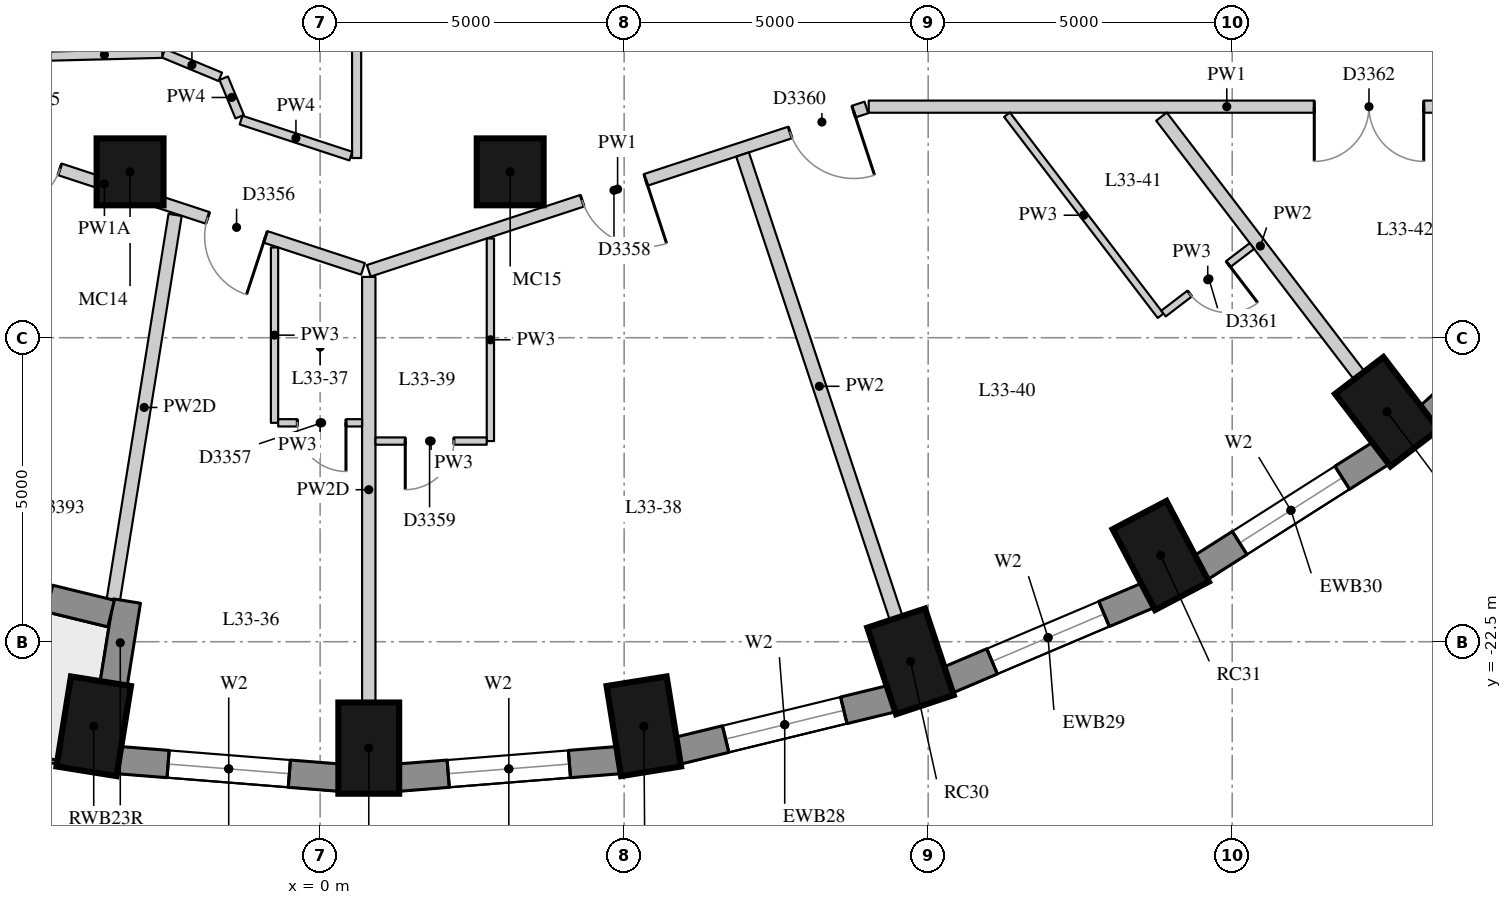
"""IFC4 building model, lengths in metres.
Left out: names, types, materials, properties, quantities, classifications, styles, units other than length and angle.
Written with IfcOpenShell. Run it as: python <this file> out.ifc"""

import sys

from ifc_helpers import new_model, si_unit, direction, frame, frame_2d, origin, origin_2d, place, context, subcontext, project, spatial, rectangle, extrude, element, fill, save


model = new_model("IFC4")
c1 = context("Model", 3, precision=1e-05, world=origin(), true_north=direction((0.0, 1.0)))
c2 = subcontext(c1, "Body", "Model", "MODEL_VIEW")
j1 = project(units=[si_unit("LENGTHUNIT", "METRE"), si_unit("PLANEANGLEUNIT", "RADIAN")], contexts=[c1])
p1 = place(None, origin())
s1 = spatial("IfcSite", under=j1, at=p1, CompositionType="ELEMENT")
p2 = place(p1, origin())
s2 = spatial("IfcBuilding", under=s1, at=p2, CompositionType="ELEMENT")
p3 = place(p2, frame((0.0, 0.0, 118.6)))
s3 = spatial("IfcBuildingStorey", under=s2, at=p3, CompositionType="ELEMENT", Elevation=118.6)
for number, where, z_axis, x_axis in (
    (1, (-3.724, -23.891, 0.0), (0.0, 0.0, 1.0), (-0.159, -0.987, 0.0)),
    (2, (0.8, -24.25, 0.0), (0.0, 0.0, 1.0), (0.0, -1.0, 0.0)),
    (3, (5.323, -23.891, 0.0), (0.0, 0.0, 1.0), (0.159, -0.987, 0.0)),
    (4, (9.71, -22.824, 0.0), (0.0, 0.0, 1.0), (0.315, -0.949, 0.0)),
    (5, (13.825, -21.082, 0.0), (0.0, 0.0, 1.0), (0.465, -0.885, 0.0)),
    (6, (17.545, -18.717, 0.0), (0.0, 0.0, 1.0), (0.607, -0.795, 0.0)),
):
    element("IfcColumn", number, at=place(p3, frame(where, z_axis=z_axis, x_axis=x_axis)), inside=s3, PredefinedType="COLUMN", context=c2, shape_type="SweptSolid", body=[
        extrude(rectangle(XDim=1.5, YDim=1.0, at=origin_2d()), origin(), (0.0, 0.0, 1.0), 3.3),
    ])
for number, where, z_axis, x_axis in (
    (7, (-3.126, -14.772, 0.0), (0.0, 0.0, 1.0), (1.0, 0.0, 0.0)),
    (8, (3.126, -14.772, 0.0), (0.0, 0.0, 1.0), (1.0, 0.0, 0.0)),
):
    element("IfcColumn", number, at=place(p3, frame(where, z_axis=z_axis, x_axis=x_axis)), inside=s3, PredefinedType="COLUMN", context=c2, shape_type="SweptSolid", body=[
        extrude(rectangle(XDim=1.1, YDim=1.1, at=origin_2d()), origin(), (0.0, 0.0, 1.0), 3.3),
    ])
p4 = place(p3, frame((-3.327, -24.447, 0.0), z_axis=(0.0, 0.0, 1.0), x_axis=(0.996862216754, -0.079156306178, 0.0)))
e9 = element("IfcWall", 9, at=p4, inside=s3, PredefinedType="SOLIDWALL", context=c2, shape_type="SweptSolid", body=[
    extrude(rectangle(XDim=3.658, YDim=0.45, at=frame_2d((1.829, 0.0))), origin(), (0.0, 0.0, 1.0), 3.02),
])
p5 = place(p4, frame((0.829, 0.0, 0.4)))
e10 = element("IfcOpeningElement", 10, at=p5, cuts=e9, PredefinedType="OPENING", context=c2, shape_type="SweptSolid", body=[
    extrude(rectangle(XDim=2.0, YDim=1.75, at=frame_2d((1.0, 0.875))), frame((0.0, 0.235, 0.0), z_axis=(0.0, -1.0, 0.0), x_axis=(1.0, 0.0, 0.0)), (0.0, 0.0, 1.0), 0.47),
])
p6 = place(p3, frame((1.28, -24.736, 0.0), z_axis=(0.0, 0.0, 1.0), x_axis=(0.996862216754, 0.079156306178, 0.0)))
e11 = element("IfcWall", 11, at=p6, inside=s3, PredefinedType="SOLIDWALL", context=c2, shape_type="SweptSolid", body=[
    extrude(rectangle(XDim=3.658, YDim=0.45, at=frame_2d((1.829, 0.0))), origin(), (0.0, 0.0, 1.0), 3.02),
])
p7 = place(p6, frame((0.829, 0.0, 0.4)))
e12 = element("IfcOpeningElement", 12, at=p7, cuts=e11, PredefinedType="OPENING", context=c2, shape_type="SweptSolid", body=[
    extrude(rectangle(XDim=2.0, YDim=1.75, at=frame_2d((1.0, 0.875))), frame((0.0, 0.235, 0.0), z_axis=(0.0, -1.0, 0.0), x_axis=(1.0, 0.0, 0.0)), (0.0, 0.0, 1.0), 0.47),
])
p8 = place(p3, frame((5.875, -24.294, 0.0), z_axis=(0.0, 0.0, 1.0), x_axis=(0.971667603162, 0.236351579148, 0.0)))
e13 = element("IfcWall", 13, at=p8, inside=s3, PredefinedType="SOLIDWALL", context=c2, shape_type="SweptSolid", body=[
    extrude(rectangle(XDim=3.635, YDim=0.45, at=frame_2d((1.817, 0.0))), origin(), (0.0, 0.0, 1.0), 3.02),
])
p9 = place(p8, frame((0.817, 0.0, 0.4)))
e14 = element("IfcOpeningElement", 14, at=p9, cuts=e13, PredefinedType="OPENING", context=c2, shape_type="SweptSolid", body=[
    extrude(rectangle(XDim=2.0, YDim=1.75, at=frame_2d((1.0, 0.875))), frame((0.0, 0.235, 0.0), z_axis=(0.0, -1.0, 0.0), x_axis=(1.0, 0.0, 0.0)), (0.0, 0.0, 1.0), 0.47),
])
p10 = place(p3, frame((10.318, -23.134, 0.0), z_axis=(0.0, 0.0, 1.0), x_axis=(0.920869643542, 0.389870619055, 0.0)))
e15 = element("IfcWall", 15, at=p10, inside=s3, PredefinedType="SOLIDWALL", context=c2, shape_type="SweptSolid", body=[
    extrude(rectangle(XDim=3.591, YDim=0.45, at=frame_2d((1.796, 0.0))), origin(), (0.0, 0.0, 1.0), 3.02),
])
p11 = place(p10, frame((0.796, 0.0, 0.4)))
e16 = element("IfcOpeningElement", 16, at=p11, cuts=e15, PredefinedType="OPENING", context=c2, shape_type="SweptSolid", body=[
    extrude(rectangle(XDim=2.0, YDim=1.75, at=frame_2d((1.0, 0.875))), frame((0.0, 0.235, 0.0), z_axis=(0.0, -1.0, 0.0), x_axis=(1.0, 0.0, 0.0)), (0.0, 0.0, 1.0), 0.47),
])
p12 = place(p3, frame((14.475, -21.287, 0.0), z_axis=(0.0, 0.0, 1.0), x_axis=(0.843911841423, 0.536481876587, 0.0)))
e17 = element("IfcWall", 17, at=p12, inside=s3, PredefinedType="SOLIDWALL", context=c2, shape_type="SweptSolid", body=[
    extrude(rectangle(XDim=3.532, YDim=0.45, at=frame_2d((1.766, 0.0))), origin(), (0.0, 0.0, 1.0), 3.02),
])
p13 = place(p12, frame((0.766, 0.0, 0.4)))
e18 = element("IfcOpeningElement", 18, at=p13, cuts=e17, PredefinedType="OPENING", context=c2, shape_type="SweptSolid", body=[
    extrude(rectangle(XDim=2.0, YDim=1.75, at=frame_2d((1.0, 0.875))), frame((0.0, 0.235, 0.0), z_axis=(0.0, -1.0, 0.0), x_axis=(1.0, 0.0, 0.0)), (0.0, 0.0, 1.0), 0.47),
])
p14 = place(p3, frame((18.219, -18.81, 0.0), z_axis=(0.0, 0.0, 1.0), x_axis=(0.740364106106, 0.672206062446, 0.0)))
e19 = element("IfcWall", 19, at=p14, inside=s3, PredefinedType="SOLIDWALL", context=c2, shape_type="SweptSolid", body=[
    extrude(rectangle(XDim=3.464, YDim=0.45, at=frame_2d((1.732, 0.0))), origin(), (0.0, 0.0, 1.0), 3.02),
])
p15 = place(p3, frame((-3.397, -23.204, 0.0), z_axis=(0.0, 0.0, 1.0), x_axis=(0.158415168535, 0.987372591466, 0.0)))
e20 = element("IfcWall", 20, at=p15, inside=s3, PredefinedType="SOLIDWALL", context=c2, shape_type="SweptSolid", body=[
    extrude(rectangle(XDim=1.39, YDim=0.45, at=frame_2d((0.695, 0.0))), origin(), (0.0, 0.0, 1.0), 2.47),
])
p16 = place(p3, frame((-7.558, -21.032, 0.0), z_axis=(0.0, 0.0, 1.0), x_axis=(0.971511611373, -0.23699195971, 0.0)))
e21 = element("IfcWall", 21, at=p16, inside=s3, PredefinedType="SOLIDWALL", context=c2, shape_type="SweptSolid", body=[
    extrude(rectangle(XDim=4.241, YDim=0.45, at=frame_2d((2.121, 0.0))), origin(), (0.0, 0.0, 1.0), 3.02),
])
p17 = place(p16, frame((1.046, 0.0, 0.4)))
e22 = element("IfcOpeningElement", 22, at=p17, cuts=e21, PredefinedType="OPENING", context=c2, shape_type="SweptSolid", body=[
    extrude(rectangle(XDim=1.0, YDim=1.75, at=frame_2d((0.5, 0.875))), frame((0.0, 0.235, 0.0), z_axis=(0.0, -1.0, 0.0), x_axis=(1.0, 0.0, 0.0)), (0.0, 0.0, 1.0), 0.47),
])
p18 = place(p16, frame((2.196, 0.0, 0.0)))
e23 = element("IfcOpeningElement", 23, at=p18, cuts=e21, PredefinedType="OPENING", context=c2, shape_type="SweptSolid", body=[
    extrude(rectangle(XDim=1.0, YDim=2.15, at=frame_2d((0.5, 1.075))), frame((0.0, 0.235, 0.0), z_axis=(0.0, -1.0, 0.0), x_axis=(1.0, 0.0, 0.0)), (0.0, 0.0, 1.0), 0.47),
])
p19 = place(p3, frame((20.8, -13.7, 0.0), z_axis=(0.0, 0.0, 1.0), x_axis=(-1.0, 0.0, 0.0)))
e24 = element("IfcWall", 24, at=p19, inside=s3, PredefinedType="PARTITIONING", context=c2, shape_type="SweptSolid", body=[
    extrude(rectangle(XDim=11.778, YDim=0.2, at=frame_2d((5.889, 0.0))), origin(), (0.0, 0.0, 1.0), 3.02),
])
p20 = place(p19, frame((2.65, 0.0, 0.0)))
e25 = element("IfcOpeningElement", 25, at=p20, cuts=e24, PredefinedType="OPENING", context=c2, shape_type="SweptSolid", body=[
    extrude(rectangle(XDim=1.8, YDim=2.1, at=frame_2d((0.9, 1.05))), frame((0.0, 0.11, 0.0), z_axis=(0.0, -1.0, 0.0), x_axis=(1.0, 0.0, 0.0)), (0.0, 0.0, 1.0), 0.22),
])
p21 = place(p3, frame((8.984, -13.713, 0.0), z_axis=(0.0, 0.0, 1.0), x_axis=(-0.950093687873, -0.311964716378, 0.0)))
e26 = element("IfcWall", 26, at=p21, inside=s3, PredefinedType="PARTITIONING", context=c2, shape_type="SweptSolid", body=[
    extrude(rectangle(XDim=8.614, YDim=0.2, at=frame_2d((4.307, 0.0))), origin(), (0.0, 0.0, 1.0), 3.02),
])
p22 = place(p21, frame((3.82, 0.0, 0.0)))
e27 = element("IfcOpeningElement", 27, at=p22, cuts=e26, PredefinedType="OPENING", context=c2, shape_type="SweptSolid", body=[
    extrude(rectangle(XDim=1.1, YDim=2.1, at=frame_2d((0.55, 1.05))), frame((0.0, 0.11, 0.0), z_axis=(0.0, -1.0, 0.0), x_axis=(1.0, 0.0, 0.0)), (0.0, 0.0, 1.0), 0.22),
])
p23 = place(p21, frame((0.22, 0.0, 0.0)))
e28 = element("IfcOpeningElement", 28, at=p23, cuts=e26, PredefinedType="OPENING", context=c2, shape_type="SweptSolid", body=[
    extrude(rectangle(XDim=1.1, YDim=2.1, at=frame_2d((0.55, 1.05))), frame((0.0, 0.11, 0.0), z_axis=(0.0, -1.0, 0.0), x_axis=(1.0, 0.0, 0.0)), (0.0, 0.0, 1.0), 0.22),
])
p24 = place(p3, frame((0.705, -16.368, 0.0), z_axis=(0.0, 0.0, 1.0), x_axis=(-0.95010544032, 0.311928921832, 0.0)))
e29 = element("IfcWall", 29, at=p24, inside=s3, PredefinedType="PARTITIONING", context=c2, shape_type="SweptSolid", body=[
    extrude(rectangle(XDim=8.951, YDim=0.2, at=frame_2d((4.476, 0.0))), origin(), (0.0, 0.0, 1.0), 2.57),
])
p25 = place(p24, frame((6.993, 0.0, 0.0)))
e30 = element("IfcOpeningElement", 30, at=p25, cuts=e29, PredefinedType="OPENING", context=c2, shape_type="SweptSolid", body=[
    extrude(rectangle(XDim=1.1, YDim=2.1, at=frame_2d((0.55, 1.05))), frame((0.0, 0.11, 0.0), z_axis=(0.0, -1.0, 0.0), x_axis=(1.0, 0.0, 0.0)), (0.0, 0.0, 1.0), 0.22),
])
p26 = place(p24, frame((5.248, 0.0, 0.0)))
e31 = element("IfcOpeningElement", 31, at=p26, cuts=e29, PredefinedType="OPENING", context=c2, shape_type="SweptSolid", body=[
    extrude(rectangle(XDim=0.9, YDim=2.1, at=frame_2d((0.45, 1.05))), frame((0.0, 0.11, 0.0), z_axis=(0.0, -1.0, 0.0), x_axis=(1.0, 0.0, 0.0)), (0.0, 0.0, 1.0), 0.22),
])
p27 = place(p24, frame((1.688, 0.0, 0.0)))
e32 = element("IfcOpeningElement", 32, at=p27, cuts=e29, PredefinedType="OPENING", context=c2, shape_type="SweptSolid", body=[
    extrude(rectangle(XDim=1.0, YDim=2.1, at=frame_2d((0.5, 1.05))), frame((0.0, 0.11, 0.0), z_axis=(0.0, -1.0, 0.0), x_axis=(1.0, 0.0, 0.0)), (0.0, 0.0, 1.0), 0.22),
])
p28 = place(p3, frame((0.6, -9.23, 0.0), z_axis=(0.0, 0.0, 1.0), x_axis=(0.0, -1.0, 0.0)))
e33 = element("IfcWall", 33, at=p28, inside=s3, PredefinedType="PARTITIONING", context=c2, shape_type="SweptSolid", body=[
    extrude(rectangle(XDim=5.315, YDim=0.15, at=frame_2d((2.657, 0.0))), origin(), (0.0, 0.0, 1.0), 3.02),
])
p29 = place(p3, frame((0.505, -14.513, 0.0), z_axis=(0.0, 0.0, 1.0), x_axis=(-0.950175898888, 0.31171422998, 0.0)))
e34 = element("IfcWall", 34, at=p29, inside=s3, PredefinedType="PARTITIONING", context=c2, shape_type="SweptSolid", body=[
    extrude(rectangle(XDim=1.9, YDim=0.15, at=frame_2d((0.95, 0.0))), origin(), (0.0, 0.0, 1.0), 3.02),
])
p30 = place(p3, frame((-1.323, -13.865, 0.0), z_axis=(0.0, 0.0, 1.0), x_axis=(-0.382970536008, 0.923760558018, 0.0)))
e35 = element("IfcWall", 35, at=p30, inside=s3, PredefinedType="PARTITIONING", context=c2, shape_type="SweptSolid", body=[
    extrude(rectangle(XDim=0.685, YDim=0.15, at=frame_2d((0.343, 0.0))), origin(), (0.0, 0.0, 1.0), 3.02),
])
p31 = place(p3, frame((-1.641, -13.209, 0.0), z_axis=(0.0, 0.0, 1.0), x_axis=(-0.923725449546, 0.383055209937, 0.0)))
e36 = element("IfcWall", 36, at=p31, inside=s3, PredefinedType="PARTITIONING", context=c2, shape_type="SweptSolid", body=[
    extrude(rectangle(XDim=1.011, YDim=0.15, at=frame_2d((0.506, 0.0))), origin(), (0.0, 0.0, 1.0), 3.02),
])
p32 = place(p3, frame((-2.596, -12.823, 0.0), z_axis=(0.0, 0.0, 1.0), x_axis=(-0.999684436087, -0.025120275573, 0.0)))
e37 = element("IfcWall", 37, at=p32, inside=s3, PredefinedType="PARTITIONING", context=c2, shape_type="SweptSolid", body=[
    extrude(rectangle(XDim=1.905, YDim=0.15, at=frame_2d((0.952, 0.0))), origin(), (0.0, 0.0, 1.0), 3.02),
])
p33 = place(p3, frame((-3.402, -21.814, 0.0), z_axis=(0.0, 0.0, 1.0), x_axis=(0.158514453841, 0.987356656899, 0.0)))
e38 = element("IfcWall", 38, at=p33, inside=s3, PredefinedType="PARTITIONING", context=c2, shape_type="SweptSolid", body=[
    extrude(rectangle(XDim=6.415, YDim=0.22, at=frame_2d((3.208, 0.0))), origin(), (0.0, 0.0, 1.0), 2.47),
])
p34 = place(p3, frame((0.8, -23.5, 0.0), z_axis=(0.0, 0.0, 1.0), x_axis=(0.0, 1.0, 0.0)))
e39 = element("IfcWall", 39, at=p34, inside=s3, PredefinedType="PARTITIONING", context=c2, shape_type="SweptSolid", body=[
    extrude(rectangle(XDim=7.0, YDim=0.22, at=frame_2d((3.5, 0.0))), origin(), (0.0, 0.0, 1.0), 2.47),
])
p35 = place(p3, frame((9.474, -22.112, 0.0), z_axis=(0.0, 0.0, 1.0), x_axis=(-0.314531362585, 0.949247081613, 0.0)))
e40 = element("IfcWall", 40, at=p35, inside=s3, PredefinedType="PARTITIONING", context=c2, shape_type="SweptSolid", body=[
    extrude(rectangle(XDim=8.033, YDim=0.22, at=frame_2d((4.017, 0.0))), origin(), (0.0, 0.0, 1.0), 3.02),
])
p36 = place(p3, frame((17.089, -18.121, 0.0), z_axis=(0.0, 0.0, 1.0), x_axis=(-0.607049146133, 0.794664290238, 0.0)))
e41 = element("IfcWall", 41, at=p36, inside=s3, PredefinedType="PARTITIONING", context=c2, shape_type="SweptSolid", body=[
    extrude(rectangle(XDim=5.357, YDim=0.22, at=frame_2d((2.679, 0.0))), origin(), (0.0, 0.0, 1.0), 3.02),
])
p37 = place(p3, frame((-0.75, -16.016, 0.0), z_axis=(0.0, 0.0, 1.0), x_axis=(0.0, -1.0, 0.0)))
e42 = element("IfcWall", 42, at=p37, inside=s3, PredefinedType="PARTITIONING", context=c2, shape_type="SweptSolid", body=[
    extrude(rectangle(XDim=2.884, YDim=0.12, at=frame_2d((1.442, 0.0))), origin(), (0.0, 0.0, 1.0), 3.02),
])
p38 = place(p3, frame((2.8, -15.868, 0.0), z_axis=(0.0, 0.0, 1.0), x_axis=(0.0, -1.0, 0.0)))
e43 = element("IfcWall", 43, at=p38, inside=s3, PredefinedType="PARTITIONING", context=c2, shape_type="SweptSolid", body=[
    extrude(rectangle(XDim=3.332, YDim=0.12, at=frame_2d((1.666, 0.0))), origin(), (0.0, 0.0, 1.0), 3.02),
])
p39 = place(p3, frame((11.296, -13.832, 0.0), z_axis=(0.0, 0.0, 1.0), x_axis=(0.607062475719, -0.794654107505, 0.0)))
e44 = element("IfcWall", 44, at=p39, inside=s3, PredefinedType="PARTITIONING", context=c2, shape_type="SweptSolid", body=[
    extrude(rectangle(XDim=4.162, YDim=0.12, at=frame_2d((2.081, 0.0))), origin(), (0.0, 0.0, 1.0), 3.02),
])
p40 = place(p3, frame((-0.69, -18.9, 0.0), z_axis=(0.0, 0.0, 1.0), x_axis=(1.0, 0.0, 0.0)))
e45 = element("IfcWall", 45, at=p40, inside=s3, PredefinedType="PARTITIONING", context=c2, shape_type="SweptSolid", body=[
    extrude(rectangle(XDim=1.38, YDim=0.12, at=frame_2d((0.69, 0.0))), origin(), (0.0, 0.0, 1.0), 3.02),
])
p41 = place(p40, frame((0.315, 0.0, 0.0)))
e46 = element("IfcOpeningElement", 46, at=p41, cuts=e45, PredefinedType="OPENING", context=c2, shape_type="SweptSolid", body=[
    extrude(rectangle(XDim=0.8, YDim=2.1, at=frame_2d((0.4, 1.05))), frame((0.0, 0.07, 0.0), z_axis=(0.0, -1.0, 0.0), x_axis=(1.0, 0.0, 0.0)), (0.0, 0.0, 1.0), 0.14),
])
p42 = place(p3, frame((2.74, -19.2, 0.0), z_axis=(0.0, 0.0, 1.0), x_axis=(-1.0, 0.0, 0.0)))
e47 = element("IfcWall", 47, at=p42, inside=s3, PredefinedType="PARTITIONING", context=c2, shape_type="SweptSolid", body=[
    extrude(rectangle(XDim=1.83, YDim=0.12, at=frame_2d((0.915, 0.0))), origin(), (0.0, 0.0, 1.0), 3.02),
])
p43 = place(p42, frame((0.54, 0.0, 0.0)))
e48 = element("IfcOpeningElement", 48, at=p43, cuts=e47, PredefinedType="OPENING", context=c2, shape_type="SweptSolid", body=[
    extrude(rectangle(XDim=0.8, YDim=2.1, at=frame_2d((0.4, 1.05))), frame((0.0, 0.07, 0.0), z_axis=(0.0, -1.0, 0.0), x_axis=(1.0, 0.0, 0.0)), (0.0, 0.0, 1.0), 0.14),
])
p44 = place(p3, frame((13.87, -17.103, 0.0), z_axis=(0.0, 0.0, 1.0), x_axis=(0.794637937609, 0.607083641776, 0.0)))
e49 = element("IfcWall", 49, at=p44, inside=s3, PredefinedType="PARTITIONING", context=c2, shape_type="SweptSolid", body=[
    extrude(rectangle(XDim=1.83, YDim=0.12, at=frame_2d((0.915, 0.0))), origin(), (0.0, 0.0, 1.0), 3.02),
])
p45 = place(p44, frame((0.54, 0.0, 0.0)))
e50 = element("IfcOpeningElement", 50, at=p45, cuts=e49, PredefinedType="OPENING", context=c2, shape_type="SweptSolid", body=[
    extrude(rectangle(XDim=0.8, YDim=2.1, at=frame_2d((0.4, 1.05))), frame((0.0, 0.07, 0.0), z_axis=(0.0, -1.0, 0.0), x_axis=(1.0, 0.0, 0.0)), (0.0, 0.0, 1.0), 0.14),
])
p46 = place(p5, origin())
e51 = element("IfcWindow", 51, at=p46, inside=s3, PartitioningType="SINGLE_PANEL", PredefinedType="WINDOW", context=c2, shape_type="SweptSolid", body=[
    extrude(rectangle(XDim=2.0, YDim=1.75, at=frame_2d((1.0, 0.875))), frame((0.0, 0.035, 0.0), z_axis=(0.0, -1.0, 0.0), x_axis=(1.0, 0.0, 0.0)), (0.0, 0.0, 1.0), 0.06),
])
fill(e10, e51)
p47 = place(p7, origin())
e52 = element("IfcWindow", 52, at=p47, inside=s3, PartitioningType="SINGLE_PANEL", PredefinedType="WINDOW", context=c2, shape_type="SweptSolid", body=[
    extrude(rectangle(XDim=2.0, YDim=1.75, at=frame_2d((1.0, 0.875))), frame((0.0, 0.035, 0.0), z_axis=(0.0, -1.0, 0.0), x_axis=(1.0, 0.0, 0.0)), (0.0, 0.0, 1.0), 0.06),
])
fill(e12, e52)
p48 = place(p9, origin())
e53 = element("IfcWindow", 53, at=p48, inside=s3, PartitioningType="SINGLE_PANEL", PredefinedType="WINDOW", context=c2, shape_type="SweptSolid", body=[
    extrude(rectangle(XDim=2.0, YDim=1.75, at=frame_2d((1.0, 0.875))), frame((0.0, 0.035, 0.0), z_axis=(0.0, -1.0, 0.0), x_axis=(1.0, 0.0, 0.0)), (0.0, 0.0, 1.0), 0.06),
])
fill(e14, e53)
p49 = place(p11, origin())
e54 = element("IfcWindow", 54, at=p49, inside=s3, PartitioningType="SINGLE_PANEL", PredefinedType="WINDOW", context=c2, shape_type="SweptSolid", body=[
    extrude(rectangle(XDim=2.0, YDim=1.75, at=frame_2d((1.0, 0.875))), frame((0.0, 0.035, 0.0), z_axis=(0.0, -1.0, 0.0), x_axis=(1.0, 0.0, 0.0)), (0.0, 0.0, 1.0), 0.06),
])
fill(e16, e54)
p50 = place(p13, origin())
e55 = element("IfcWindow", 55, at=p50, inside=s3, PartitioningType="SINGLE_PANEL", PredefinedType="WINDOW", context=c2, shape_type="SweptSolid", body=[
    extrude(rectangle(XDim=2.0, YDim=1.75, at=frame_2d((1.0, 0.875))), frame((0.0, 0.035, 0.0), z_axis=(0.0, -1.0, 0.0), x_axis=(1.0, 0.0, 0.0)), (0.0, 0.0, 1.0), 0.06),
])
fill(e18, e55)
p51 = place(p26, origin())
e56 = element("IfcDoor", 56, at=p51, inside=s3, OperationType="SINGLE_SWING_RIGHT", PredefinedType="DOOR", context=c2, shape_type="SweptSolid", body=[
    extrude(rectangle(XDim=0.9, YDim=2.1, at=frame_2d((0.45, 1.05))), frame((0.0, 0.025, 0.0), z_axis=(0.0, -1.0, 0.0), x_axis=(1.0, 0.0, 0.0)), (0.0, 0.0, 1.0), 0.05),
])
fill(e31, e56)
p52 = place(p27, origin())
e57 = element("IfcDoor", 57, at=p52, inside=s3, OperationType="SINGLE_SWING_LEFT", PredefinedType="DOOR", context=c2, shape_type="SweptSolid", body=[
    extrude(rectangle(XDim=1.0, YDim=2.1, at=frame_2d((0.5, 1.05))), frame((0.0, 0.025, 0.0), z_axis=(0.0, -1.0, 0.0), x_axis=(1.0, 0.0, 0.0)), (0.0, 0.0, 1.0), 0.05),
])
fill(e32, e57)
p53 = place(p41, origin())
e58 = element("IfcDoor", 58, at=p53, inside=s3, OperationType="SINGLE_SWING_LEFT", PredefinedType="DOOR", context=c2, shape_type="SweptSolid", body=[
    extrude(rectangle(XDim=0.8, YDim=2.1, at=frame_2d((0.4, 1.05))), frame((0.0, 0.025, 0.0), z_axis=(0.0, -1.0, 0.0), x_axis=(1.0, 0.0, 0.0)), (0.0, 0.0, 1.0), 0.05),
])
fill(e46, e58)
p54 = place(p22, origin())
e59 = element("IfcDoor", 59, at=p54, inside=s3, OperationType="SINGLE_SWING_LEFT", PredefinedType="DOOR", context=c2, shape_type="SweptSolid", body=[
    extrude(rectangle(XDim=1.1, YDim=2.1, at=frame_2d((0.55, 1.05))), frame((0.0, 0.025, 0.0), z_axis=(0.0, -1.0, 0.0), x_axis=(1.0, 0.0, 0.0)), (0.0, 0.0, 1.0), 0.05),
])
fill(e27, e59)
p55 = place(p43, origin())
e60 = element("IfcDoor", 60, at=p55, inside=s3, OperationType="SINGLE_SWING_RIGHT", PredefinedType="DOOR", context=c2, shape_type="SweptSolid", body=[
    extrude(rectangle(XDim=0.8, YDim=2.1, at=frame_2d((0.4, 1.05))), frame((0.0, 0.025, 0.0), z_axis=(0.0, -1.0, 0.0), x_axis=(1.0, 0.0, 0.0)), (0.0, 0.0, 1.0), 0.05),
])
fill(e48, e60)
p56 = place(p23, origin())
e61 = element("IfcDoor", 61, at=p56, inside=s3, OperationType="SINGLE_SWING_LEFT", PredefinedType="DOOR", context=c2, shape_type="SweptSolid", body=[
    extrude(rectangle(XDim=1.1, YDim=2.1, at=frame_2d((0.55, 1.05))), frame((0.0, 0.025, 0.0), z_axis=(0.0, -1.0, 0.0), x_axis=(1.0, 0.0, 0.0)), (0.0, 0.0, 1.0), 0.05),
])
fill(e28, e61)
p57 = place(p45, origin())
e62 = element("IfcDoor", 62, at=p57, inside=s3, OperationType="SINGLE_SWING_LEFT", PredefinedType="DOOR", context=c2, shape_type="SweptSolid", body=[
    extrude(rectangle(XDim=0.8, YDim=2.1, at=frame_2d((0.4, 1.05))), frame((0.0, 0.025, 0.0), z_axis=(0.0, -1.0, 0.0), x_axis=(1.0, 0.0, 0.0)), (0.0, 0.0, 1.0), 0.05),
])
fill(e50, e62)
p58 = place(p20, origin())
e63 = element("IfcDoor", 63, at=p58, inside=s3, OperationType="DOUBLE_DOOR_SINGLE_SWING", PredefinedType="DOOR", context=c2, shape_type="SweptSolid", body=[
    extrude(rectangle(XDim=1.8, YDim=2.1, at=frame_2d((0.9, 1.05))), frame((0.0, 0.025, 0.0), z_axis=(0.0, -1.0, 0.0), x_axis=(1.0, 0.0, 0.0)), (0.0, 0.0, 1.0), 0.05),
])
fill(e25, e63)
save(model, sys.argv[1])
